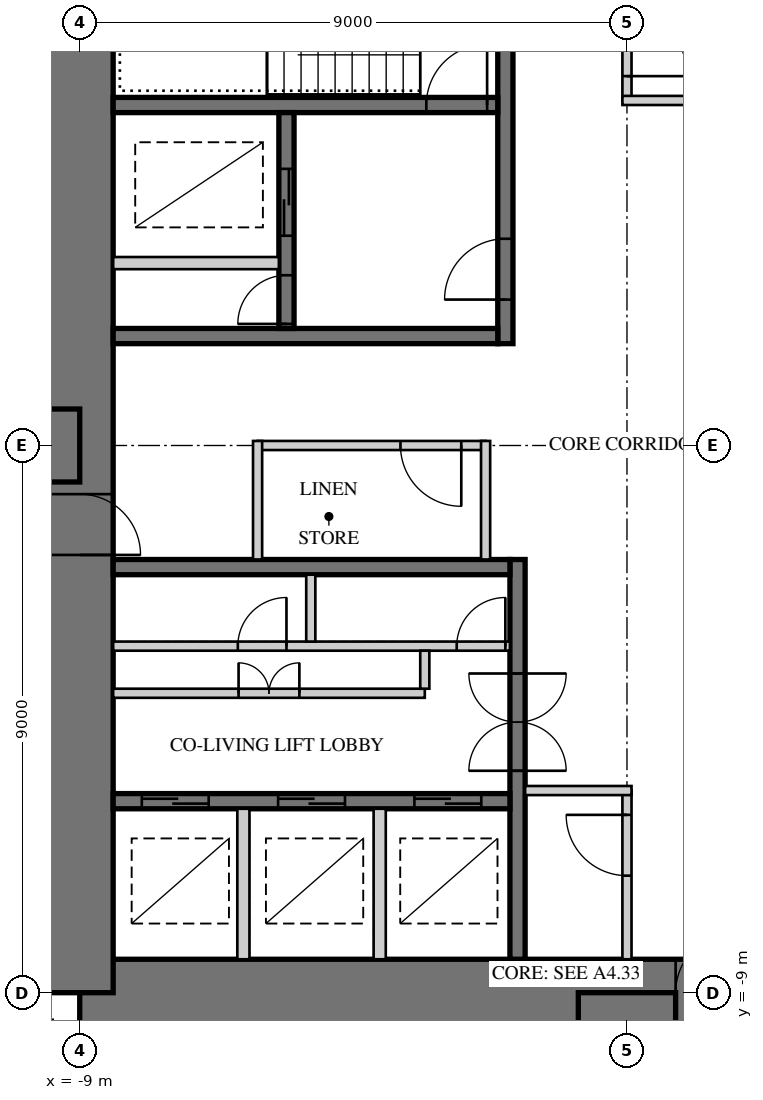
"""IFC4 building model, lengths in metres.
Left out: names, types, materials, properties, quantities, classifications, styles, units other than length and angle.
Written with IfcOpenShell. Run it as: python <this file> out.ifc"""

import sys

from ifc_helpers import new_model, si_unit, direction, frame, frame_2d, origin, place, context, subcontext, project, spatial, rectangle, extrude, element, fill, save


model = new_model("IFC4")
c1 = context("Model", 3, precision=1e-05, world=origin(), true_north=direction((0.0, 1.0)))
c2 = subcontext(c1, "Body", "Model", "MODEL_VIEW")
j1 = project(units=[si_unit("LENGTHUNIT", "METRE"), si_unit("PLANEANGLEUNIT", "RADIAN")], contexts=[c1])
p1 = place(None, origin())
s1 = spatial("IfcSite", under=j1, at=p1, CompositionType="ELEMENT")
p2 = place(p1, origin())
s2 = spatial("IfcBuilding", under=s1, at=p2, CompositionType="ELEMENT")
p3 = place(p2, frame((0.0, 0.0, 213.7)))
s3 = spatial("IfcBuildingStorey", under=s2, at=p3, CompositionType="ELEMENT", Elevation=213.7)
p4 = place(p3, frame((-9.0, -9.0, 0.0), z_axis=(0.0, 0.0, 1.0), x_axis=(1.0, 0.0, 0.0)))
e1 = element("IfcWall", 1, at=p4, inside=s3, PredefinedType="SHEAR", context=c2, shape_type="SweptSolid", body=[
    extrude(rectangle(XDim=18.0, YDim=1.1, at=frame_2d((9.0, 0.0))), origin(), (0.0, 0.0, 1.0), 3.4),
])
p5 = place(p4, frame((9.8, 0.0, 0.0)))
e2 = element("IfcOpeningElement", 2, at=p5, cuts=e1, PredefinedType="OPENING", context=c2, shape_type="SweptSolid", body=[
    extrude(rectangle(XDim=1.0, YDim=2.4, at=frame_2d((0.5, 1.2))), frame((0.0, 0.56, 0.0), z_axis=(0.0, -1.0, 0.0), x_axis=(1.0, 0.0, 0.0)), (0.0, 0.0, 1.0), 1.12),
])
p6 = place(p3, frame((-9.0, 9.0, 0.0), z_axis=(0.0, 0.0, 1.0), x_axis=(0.0, -1.0, 0.0)))
e3 = element("IfcWall", 3, at=p6, inside=s3, PredefinedType="SHEAR", context=c2, shape_type="SweptSolid", body=[
    extrude(rectangle(XDim=18.0, YDim=1.1, at=frame_2d((9.0, 0.0))), origin(), (0.0, 0.0, 1.0), 3.4),
])
p7 = place(p6, frame((9.8, 0.0, 0.0)))
e4 = element("IfcOpeningElement", 4, at=p7, cuts=e3, PredefinedType="OPENING", context=c2, shape_type="SweptSolid", body=[
    extrude(rectangle(XDim=1.0, YDim=2.4, at=frame_2d((0.5, 1.2))), frame((0.0, 0.56, 0.0), z_axis=(0.0, -1.0, 0.0), x_axis=(1.0, 0.0, 0.0)), (0.0, 0.0, 1.0), 1.12),
])
p8 = place(p3, frame((-2.0, 1.675, 0.0), z_axis=(0.0, 0.0, 1.0), x_axis=(0.0, 1.0, 0.0)))
e5 = element("IfcWall", 5, at=p8, inside=s3, PredefinedType="SHEAR", context=c2, shape_type="SweptSolid", body=[
    extrude(rectangle(XDim=6.775, YDim=0.25, at=frame_2d((3.387, 0.0))), origin(), (0.0, 0.0, 1.0), 3.4),
])
p9 = place(p8, frame((0.725, 0.0, 0.0)))
e6 = element("IfcOpeningElement", 6, at=p9, cuts=e5, PredefinedType="OPENING", context=c2, shape_type="SweptSolid", body=[
    extrude(rectangle(XDim=1.0, YDim=2.1, at=frame_2d((0.5, 1.05))), frame((0.0, 0.135, 0.0), z_axis=(0.0, -1.0, 0.0), x_axis=(1.0, 0.0, 0.0)), (0.0, 0.0, 1.0), 0.27),
])
p10 = place(p3, frame((-2.125, 1.8, 0.0), z_axis=(0.0, 0.0, 1.0), x_axis=(-1.0, 0.0, 0.0)))
e7 = element("IfcWall", 7, at=p10, inside=s3, PredefinedType="SHEAR", context=c2, shape_type="SweptSolid", body=[
    extrude(rectangle(XDim=6.325, YDim=0.25, at=frame_2d((3.163, 0.0))), origin(), (0.0, 0.0, 1.0), 3.4),
])
p11 = place(p3, frame((-2.125, 5.6, 0.0), z_axis=(0.0, 0.0, 1.0), x_axis=(-1.0, 0.0, 0.0)))
e8 = element("IfcWall", 8, at=p11, inside=s3, PredefinedType="SHEAR", context=c2, shape_type="SweptSolid", body=[
    extrude(rectangle(XDim=6.325, YDim=0.25, at=frame_2d((3.163, 0.0))), origin(), (0.0, 0.0, 1.0), 3.4),
])
p12 = place(p11, frame((0.175, 0.0, 0.0)))
e9 = element("IfcOpeningElement", 9, at=p12, cuts=e8, PredefinedType="OPENING", context=c2, shape_type="SweptSolid", body=[
    extrude(rectangle(XDim=1.0, YDim=2.1, at=frame_2d((0.5, 1.05))), frame((0.0, 0.135, 0.0), z_axis=(0.0, -1.0, 0.0), x_axis=(1.0, 0.0, 0.0)), (0.0, 0.0, 1.0), 0.27),
])
p13 = place(p3, frame((-5.6, 1.925, 0.0), z_axis=(0.0, 0.0, 1.0), x_axis=(0.0, 1.0, 0.0)))
e10 = element("IfcWall", 10, at=p13, inside=s3, PredefinedType="SHEAR", context=c2, shape_type="SweptSolid", body=[
    extrude(rectangle(XDim=3.55, YDim=0.25, at=frame_2d((1.775, 0.0))), origin(), (0.0, 0.0, 1.0), 3.4),
])
p14 = place(p13, frame((1.525, 0.0, 0.0)))
e11 = element("IfcOpeningElement", 11, at=p14, cuts=e10, PredefinedType="OPENING", context=c2, shape_type="SweptSolid", body=[
    extrude(rectangle(XDim=1.1, YDim=2.2, at=frame_2d((0.55, 1.1))), frame((0.0, 0.135, 0.0), z_axis=(0.0, -1.0, 0.0), x_axis=(1.0, 0.0, 0.0)), (0.0, 0.0, 1.0), 0.27),
])
p15 = place(p13, frame((0.075, 0.0, 0.0)))
e12 = element("IfcOpeningElement", 12, at=p15, cuts=e10, PredefinedType="OPENING", context=c2, shape_type="SweptSolid", body=[
    extrude(rectangle(XDim=0.8, YDim=2.1, at=frame_2d((0.4, 1.05))), frame((0.0, 0.135, 0.0), z_axis=(0.0, -1.0, 0.0), x_axis=(1.0, 0.0, 0.0)), (0.0, 0.0, 1.0), 0.27),
])
p16 = place(p3, frame((-5.725, 3.0, 0.0), z_axis=(0.0, 0.0, 1.0), x_axis=(-1.0, 0.0, 0.0)))
e13 = element("IfcWall", 13, at=p16, inside=s3, PredefinedType="PARTITIONING", context=c2, shape_type="SweptSolid", body=[
    extrude(rectangle(XDim=2.725, YDim=0.2, at=frame_2d((1.362, 0.0))), origin(), (0.0, 0.0, 1.0), 3.4),
])
p17 = place(p3, frame((-1.8, -1.875, 0.0), z_axis=(0.0, 0.0, 1.0), x_axis=(0.0, -1.0, 0.0)))
e14 = element("IfcWall", 14, at=p17, inside=s3, PredefinedType="SHEAR", context=c2, shape_type="SweptSolid", body=[
    extrude(rectangle(XDim=6.575, YDim=0.25, at=frame_2d((3.288, 0.0))), origin(), (0.0, 0.0, 1.0), 3.4),
])
p18 = place(p17, frame((1.875, 0.0, 0.0)))
e15 = element("IfcOpeningElement", 15, at=p18, cuts=e14, PredefinedType="OPENING", context=c2, shape_type="SweptSolid", body=[
    extrude(rectangle(XDim=1.6, YDim=2.4, at=frame_2d((0.8, 1.2))), frame((0.0, 0.135, 0.0), z_axis=(0.0, -1.0, 0.0), x_axis=(1.0, 0.0, 0.0)), (0.0, 0.0, 1.0), 0.27),
])
p19 = place(p3, frame((-1.925, -2.0, 0.0), z_axis=(0.0, 0.0, 1.0), x_axis=(-1.0, 0.0, 0.0)))
e16 = element("IfcWall", 16, at=p19, inside=s3, PredefinedType="SHEAR", context=c2, shape_type="SweptSolid", body=[
    extrude(rectangle(XDim=6.525, YDim=0.25, at=frame_2d((3.262, 0.0))), origin(), (0.0, 0.0, 1.0), 3.4),
])
p20 = place(p3, frame((-1.925, -5.85, 0.0), z_axis=(0.0, 0.0, 1.0), x_axis=(-1.0, 0.0, 0.0)))
e17 = element("IfcWall", 17, at=p20, inside=s3, PredefinedType="SHEAR", context=c2, shape_type="SweptSolid", body=[
    extrude(rectangle(XDim=6.525, YDim=0.25, at=frame_2d((3.262, 0.0))), origin(), (0.0, 0.0, 1.0), 3.4),
])
p21 = place(p20, frame((0.471, 0.0, 0.0)))
e18 = element("IfcOpeningElement", 18, at=p21, cuts=e17, PredefinedType="OPENING", context=c2, shape_type="SweptSolid", body=[
    extrude(rectangle(XDim=1.1, YDim=2.2, at=frame_2d((0.55, 1.1))), frame((0.0, 0.135, 0.0), z_axis=(0.0, -1.0, 0.0), x_axis=(1.0, 0.0, 0.0)), (0.0, 0.0, 1.0), 0.27),
])
p22 = place(p20, frame((2.712, 0.0, 0.0)))
e19 = element("IfcOpeningElement", 19, at=p22, cuts=e17, PredefinedType="OPENING", context=c2, shape_type="SweptSolid", body=[
    extrude(rectangle(XDim=1.1, YDim=2.2, at=frame_2d((0.55, 1.1))), frame((0.0, 0.135, 0.0), z_axis=(0.0, -1.0, 0.0), x_axis=(1.0, 0.0, 0.0)), (0.0, 0.0, 1.0), 0.27),
])
p23 = place(p20, frame((4.954, 0.0, 0.0)))
e20 = element("IfcOpeningElement", 20, at=p23, cuts=e17, PredefinedType="OPENING", context=c2, shape_type="SweptSolid", body=[
    extrude(rectangle(XDim=1.1, YDim=2.2, at=frame_2d((0.55, 1.1))), frame((0.0, 0.135, 0.0), z_axis=(0.0, -1.0, 0.0), x_axis=(1.0, 0.0, 0.0)), (0.0, 0.0, 1.0), 0.27),
])
p24 = place(p3, frame((-1.925, -3.3, 0.0), z_axis=(0.0, 0.0, 1.0), x_axis=(-1.0, 0.0, 0.0)))
e21 = element("IfcWall", 21, at=p24, inside=s3, PredefinedType="PARTITIONING", context=c2, shape_type="SweptSolid", body=[
    extrude(rectangle(XDim=6.525, YDim=0.15, at=frame_2d((3.262, 0.0))), origin(), (0.0, 0.0, 1.0), 3.4),
])
p25 = place(p24, frame((0.075, 0.0, 0.0)))
e22 = element("IfcOpeningElement", 22, at=p25, cuts=e21, PredefinedType="OPENING", context=c2, shape_type="SweptSolid", body=[
    extrude(rectangle(XDim=0.8, YDim=2.1, at=frame_2d((0.4, 1.05))), frame((0.0, 0.085, 0.0), z_axis=(0.0, -1.0, 0.0), x_axis=(1.0, 0.0, 0.0)), (0.0, 0.0, 1.0), 0.17),
])
p26 = place(p24, frame((3.675, 0.0, 0.0)))
e23 = element("IfcOpeningElement", 23, at=p26, cuts=e21, PredefinedType="OPENING", context=c2, shape_type="SweptSolid", body=[
    extrude(rectangle(XDim=0.8, YDim=2.1, at=frame_2d((0.4, 1.05))), frame((0.0, 0.085, 0.0), z_axis=(0.0, -1.0, 0.0), x_axis=(1.0, 0.0, 0.0)), (0.0, 0.0, 1.0), 0.17),
])
p27 = place(p3, frame((-5.2, -2.125, 0.0), z_axis=(0.0, 0.0, 1.0), x_axis=(0.0, -1.0, 0.0)))
e24 = element("IfcWall", 24, at=p27, inside=s3, PredefinedType="PARTITIONING", context=c2, shape_type="SweptSolid", body=[
    extrude(rectangle(XDim=1.1, YDim=0.15, at=frame_2d((0.55, 0.0))), origin(), (0.0, 0.0, 1.0), 3.4),
])
for number, where, z_axis, x_axis in (
    (25, (-4.067, -5.975, 0.0), (0.0, 0.0, 1.0), (0.0, -1.0, 0.0)),
    (26, (-6.308, -5.975, 0.0), (0.0, 0.0, 1.0), (0.0, -1.0, 0.0)),
):
    element("IfcWall", number, at=place(p3, frame(where, z_axis=z_axis, x_axis=x_axis)), inside=s3, PredefinedType="PARTITIONING", context=c2, shape_type="SweptSolid", body=[
        extrude(rectangle(XDim=2.475, YDim=0.2, at=frame_2d((1.237, 0.0))), origin(), (0.0, 0.0, 1.0), 3.4),
    ])
p28 = place(p3, frame((0.0, -9.0, 0.0), z_axis=(0.0, 0.0, 1.0), x_axis=(0.0, -1.0, 0.0)))
e27 = element("IfcWall", 27, at=p28, inside=s3, PredefinedType="SHEAR", context=c2, shape_type="SweptSolid", body=[
    extrude(rectangle(XDim=4.05, YDim=1.6, at=frame_2d((2.025, 0.0))), origin(), (0.0, 0.0, 1.0), 3.4),
])
p29 = place(p3, frame((-9.0, 0.0, 0.0), z_axis=(0.0, 0.0, 1.0), x_axis=(-1.0, 0.0, 0.0)))
e28 = element("IfcWall", 28, at=p29, inside=s3, PredefinedType="SHEAR", context=c2, shape_type="SweptSolid", body=[
    extrude(rectangle(XDim=18.0, YDim=1.2, at=frame_2d((9.0, 0.0))), origin(), (0.0, 0.0, 1.0), 3.4),
])
p30 = place(p29, frame((3.95, 0.0, 0.0)))
e29 = element("IfcOpeningElement", 29, at=p30, cuts=e28, PredefinedType="OPENING", context=c2, shape_type="SweptSolid", body=[
    extrude(rectangle(XDim=1.0, YDim=2.15, at=frame_2d((0.5, 1.075))), frame((0.0, 0.61, 0.0), z_axis=(0.0, -1.0, 0.0), x_axis=(1.0, 0.0, 0.0)), (0.0, 0.0, 1.0), 1.22),
])
p31 = place(p29, frame((6.6, 0.0, 0.0)))
e30 = element("IfcOpeningElement", 30, at=p31, cuts=e28, PredefinedType="OPENING", context=c2, shape_type="SweptSolid", body=[
    extrude(rectangle(XDim=1.0, YDim=2.15, at=frame_2d((0.5, 1.075))), frame((0.0, 0.61, 0.0), z_axis=(0.0, -1.0, 0.0), x_axis=(1.0, 0.0, 0.0)), (0.0, 0.0, 1.0), 1.22),
])
p32 = place(p29, frame((13.25, 0.0, 0.0)))
e31 = element("IfcOpeningElement", 31, at=p32, cuts=e28, PredefinedType="OPENING", context=c2, shape_type="SweptSolid", body=[
    extrude(rectangle(XDim=1.0, YDim=2.0, at=frame_2d((0.5, 1.0))), frame((0.0, 0.61, 0.0), z_axis=(0.0, -1.0, 0.0), x_axis=(1.0, 0.0, 0.0)), (0.0, 0.0, 1.0), 1.22),
])
p33 = place(p3, frame((-9.57, -9.445, 0.0), z_axis=(0.0, 0.0, 1.0), x_axis=(0.0, -1.0, 0.0)))
e32 = element("IfcWall", 32, at=p33, inside=s3, PredefinedType="SOLIDWALL", context=c2, shape_type="SweptSolid", body=[
    extrude(rectangle(XDim=3.125, YDim=0.25, at=frame_2d((1.562, 0.0))), origin(), (0.0, 0.0, 1.0), 3.15),
])
p34 = place(p33, frame((0.6, 0.0, 0.0)))
e33 = element("IfcOpeningElement", 33, at=p34, cuts=e32, PredefinedType="OPENING", context=c2, shape_type="SweptSolid", body=[
    extrude(rectangle(XDim=1.0, YDim=2.2, at=frame_2d((0.5, 1.1))), frame((0.0, 0.135, 0.0), z_axis=(0.0, -1.0, 0.0), x_axis=(1.0, 0.0, 0.0)), (0.0, 0.0, 1.0), 0.27),
])
p35 = place(p3, frame((-2.325, 0.0, 0.0), z_axis=(0.0, 0.0, 1.0), x_axis=(-1.0, 0.0, 0.0)))
e34 = element("IfcWall", 34, at=p35, inside=s3, PredefinedType="PARTITIONING", context=c2, shape_type="SweptSolid", body=[
    extrude(rectangle(XDim=3.75, YDim=0.15, at=frame_2d((1.875, 0.0))), origin(), (0.0, 0.0, 1.0), 3.15),
])
p36 = place(p35, frame((0.4, 0.0, 0.0)))
e35 = element("IfcOpeningElement", 35, at=p36, cuts=e34, PredefinedType="OPENING", context=c2, shape_type="SweptSolid", body=[
    extrude(rectangle(XDim=1.0, YDim=2.1, at=frame_2d((0.5, 1.05))), frame((0.0, 0.085, 0.0), z_axis=(0.0, -1.0, 0.0), x_axis=(1.0, 0.0, 0.0)), (0.0, 0.0, 1.0), 0.17),
])
for number, where, z_axis, x_axis in (
    (36, (-2.325, -1.875, 0.0), (0.0, 0.0, 1.0), (0.0, 1.0, 0.0)),
    (37, (-6.075, 0.075, 0.0), (0.0, 0.0, 1.0), (0.0, -1.0, 0.0)),
):
    element("IfcWall", number, at=place(p3, frame(where, z_axis=z_axis, x_axis=x_axis)), inside=s3, PredefinedType="PARTITIONING", context=c2, shape_type="SweptSolid", body=[
        extrude(rectangle(XDim=1.95, YDim=0.15, at=frame_2d((0.975, 0.0))), origin(), (0.0, 0.0, 1.0), 3.15),
    ])
p37 = place(p3, frame((0.0, 5.675, 0.0), z_axis=(0.0, 0.0, 1.0), x_axis=(0.0, 1.0, 0.0)))
e38 = element("IfcWall", 38, at=p37, inside=s3, PredefinedType="PARTITIONING", context=c2, shape_type="SweptSolid", body=[
    extrude(rectangle(XDim=2.775, YDim=0.15, at=frame_2d((1.387, 0.0))), origin(), (0.0, 0.0, 1.0), 3.15),
])
p38 = place(p37, frame((0.4, 0.0, 0.0)))
e39 = element("IfcOpeningElement", 39, at=p38, cuts=e38, PredefinedType="OPENING", context=c2, shape_type="SweptSolid", body=[
    extrude(rectangle(XDim=1.0, YDim=2.1, at=frame_2d((0.5, 1.05))), frame((0.0, 0.085, 0.0), z_axis=(0.0, -1.0, 0.0), x_axis=(1.0, 0.0, 0.0)), (0.0, 0.0, 1.0), 0.17),
])
p39 = place(p3, frame((1.675, 5.675, 0.0), z_axis=(0.0, 0.0, 1.0), x_axis=(-1.0, 0.0, 0.0)))
e40 = element("IfcWall", 40, at=p39, inside=s3, PredefinedType="PARTITIONING", context=c2, shape_type="SweptSolid", body=[
    extrude(rectangle(XDim=1.75, YDim=0.15, at=frame_2d((0.875, 0.0))), origin(), (0.0, 0.0, 1.0), 3.15),
])
p40 = place(p3, frame((0.0, -5.675, 0.0), z_axis=(0.0, 0.0, 1.0), x_axis=(0.0, -1.0, 0.0)))
e41 = element("IfcWall", 41, at=p40, inside=s3, PredefinedType="PARTITIONING", context=c2, shape_type="SweptSolid", body=[
    extrude(rectangle(XDim=2.775, YDim=0.15, at=frame_2d((1.387, 0.0))), origin(), (0.0, 0.0, 1.0), 3.15),
])
p41 = place(p40, frame((0.4, 0.0, 0.0)))
e42 = element("IfcOpeningElement", 42, at=p41, cuts=e41, PredefinedType="OPENING", context=c2, shape_type="SweptSolid", body=[
    extrude(rectangle(XDim=1.0, YDim=2.1, at=frame_2d((0.5, 1.05))), frame((0.0, 0.085, 0.0), z_axis=(0.0, -1.0, 0.0), x_axis=(1.0, 0.0, 0.0)), (0.0, 0.0, 1.0), 0.17),
])
p42 = place(p3, frame((-1.675, -5.675, 0.0), z_axis=(0.0, 0.0, 1.0), x_axis=(1.0, 0.0, 0.0)))
e43 = element("IfcWall", 43, at=p42, inside=s3, PredefinedType="PARTITIONING", context=c2, shape_type="SweptSolid", body=[
    extrude(rectangle(XDim=1.75, YDim=0.15, at=frame_2d((0.875, 0.0))), origin(), (0.0, 0.0, 1.0), 3.15),
])
p43 = place(p3, frame((-3.325, -4.075, 0.0), z_axis=(0.0, 0.0, 1.0), x_axis=(-1.0, 0.0, 0.0)))
e44 = element("IfcWall", 44, at=p43, inside=s3, PredefinedType="PARTITIONING", context=c2, shape_type="SweptSolid", body=[
    extrude(rectangle(XDim=5.125, YDim=0.15, at=frame_2d((2.562, 0.0))), origin(), (0.0, 0.0, 1.0), 3.15),
])
p44 = place(p43, frame((2.062, 0.0, 0.0)))
e45 = element("IfcOpeningElement", 45, at=p44, cuts=e44, PredefinedType="OPENING", context=c2, shape_type="SweptSolid", body=[
    extrude(rectangle(XDim=1.0, YDim=2.1, at=frame_2d((0.5, 1.05))), frame((0.0, 0.085, 0.0), z_axis=(0.0, -1.0, 0.0), x_axis=(1.0, 0.0, 0.0)), (0.0, 0.0, 1.0), 0.17),
])
p45 = place(p3, frame((-3.325, -3.375, 0.0), z_axis=(0.0, 0.0, 1.0), x_axis=(0.0, -1.0, 0.0)))
e46 = element("IfcWall", 46, at=p45, inside=s3, PredefinedType="PARTITIONING", context=c2, shape_type="SweptSolid", body=[
    extrude(rectangle(XDim=0.625, YDim=0.15, at=frame_2d((0.312, 0.0))), origin(), (0.0, 0.0, 1.0), 3.15),
])
p46 = place(p36, origin())
e47 = element("IfcDoor", 47, at=p46, inside=s3, OperationType="SINGLE_SWING_LEFT", PredefinedType="DOOR", context=c2, shape_type="SweptSolid", body=[
    extrude(rectangle(XDim=1.0, YDim=2.1, at=frame_2d((0.5, 1.05))), frame((0.0, 0.025, 0.0), z_axis=(0.0, -1.0, 0.0), x_axis=(1.0, 0.0, 0.0)), (0.0, 0.0, 1.0), 0.05),
])
fill(e35, e47)
p47 = place(p38, frame((1.0, 0.0, 0.0), z_axis=(0.0, 0.0, 1.0), x_axis=(-1.0, 0.0, 0.0)))
e48 = element("IfcDoor", 48, at=p47, inside=s3, OperationType="SINGLE_SWING_RIGHT", PredefinedType="DOOR", context=c2, shape_type="SweptSolid", body=[
    extrude(rectangle(XDim=1.0, YDim=2.1, at=frame_2d((0.5, 1.05))), frame((0.0, 0.025, 0.0), z_axis=(0.0, -1.0, 0.0), x_axis=(1.0, 0.0, 0.0)), (0.0, 0.0, 1.0), 0.05),
])
fill(e39, e48)
p48 = place(p41, frame((1.0, 0.0, 0.0), z_axis=(0.0, 0.0, 1.0), x_axis=(-1.0, 0.0, 0.0)))
e49 = element("IfcDoor", 49, at=p48, inside=s3, OperationType="SINGLE_SWING_RIGHT", PredefinedType="DOOR", context=c2, shape_type="SweptSolid", body=[
    extrude(rectangle(XDim=1.0, YDim=2.1, at=frame_2d((0.5, 1.05))), frame((0.0, 0.025, 0.0), z_axis=(0.0, -1.0, 0.0), x_axis=(1.0, 0.0, 0.0)), (0.0, 0.0, 1.0), 0.05),
])
fill(e42, e49)
p49 = place(p44, frame((1.0, 0.0, 0.0), z_axis=(0.0, 0.0, 1.0), x_axis=(-1.0, 0.0, 0.0)))
e50 = element("IfcDoor", 50, at=p49, inside=s3, OperationType="DOUBLE_DOOR_SINGLE_SWING", PredefinedType="DOOR", context=c2, shape_type="SweptSolid", body=[
    extrude(rectangle(XDim=1.0, YDim=2.1, at=frame_2d((0.5, 1.05))), frame((0.0, 0.025, 0.0), z_axis=(0.0, -1.0, 0.0), x_axis=(1.0, 0.0, 0.0)), (0.0, 0.0, 1.0), 0.05),
])
fill(e45, e50)
p50 = place(p5, origin())
e51 = element("IfcDoor", 51, at=p50, inside=s3, OperationType="SINGLE_SWING_RIGHT", PredefinedType="DOOR", context=c2, shape_type="SweptSolid", body=[
    extrude(rectangle(XDim=1.0, YDim=2.4, at=frame_2d((0.5, 1.2))), frame((0.0, 0.055, 0.0), z_axis=(0.0, -1.0, 0.0), x_axis=(1.0, 0.0, 0.0)), (0.0, 0.0, 1.0), 0.05),
])
fill(e2, e51)
p51 = place(p7, origin())
e52 = element("IfcDoor", 52, at=p51, inside=s3, OperationType="SINGLE_SWING_RIGHT", PredefinedType="DOOR", context=c2, shape_type="SweptSolid", body=[
    extrude(rectangle(XDim=1.0, YDim=2.4, at=frame_2d((0.5, 1.2))), frame((0.0, 0.055, 0.0), z_axis=(0.0, -1.0, 0.0), x_axis=(1.0, 0.0, 0.0)), (0.0, 0.0, 1.0), 0.05),
])
fill(e4, e52)
p52 = place(p9, origin())
e53 = element("IfcDoor", 53, at=p52, inside=s3, OperationType="SINGLE_SWING_LEFT", PredefinedType="DOOR", context=c2, shape_type="SweptSolid", body=[
    extrude(rectangle(XDim=1.0, YDim=2.1, at=frame_2d((0.5, 1.05))), frame((0.0, 0.025, 0.0), z_axis=(0.0, -1.0, 0.0), x_axis=(1.0, 0.0, 0.0)), (0.0, 0.0, 1.0), 0.05),
])
fill(e6, e53)
p53 = place(p12, frame((1.0, 0.0, 0.0), z_axis=(0.0, 0.0, 1.0), x_axis=(-1.0, 0.0, 0.0)))
e54 = element("IfcDoor", 54, at=p53, inside=s3, OperationType="SINGLE_SWING_RIGHT", PredefinedType="DOOR", context=c2, shape_type="SweptSolid", body=[
    extrude(rectangle(XDim=1.0, YDim=2.1, at=frame_2d((0.5, 1.05))), frame((0.0, 0.025, 0.0), z_axis=(0.0, -1.0, 0.0), x_axis=(1.0, 0.0, 0.0)), (0.0, 0.0, 1.0), 0.05),
])
fill(e9, e54)
p54 = place(p14, origin())
e55 = element("IfcDoor", 55, at=p54, inside=s3, OperationType="DOUBLE_DOOR_SLIDING", PredefinedType="DOOR", context=c2, shape_type="SweptSolid", body=[
    extrude(rectangle(XDim=1.1, YDim=2.2, at=frame_2d((0.55, 1.1))), frame((0.0, 0.025, 0.0), z_axis=(0.0, -1.0, 0.0), x_axis=(1.0, 0.0, 0.0)), (0.0, 0.0, 1.0), 0.05),
])
fill(e11, e55)
p55 = place(p15, origin())
e56 = element("IfcDoor", 56, at=p55, inside=s3, OperationType="SINGLE_SWING_LEFT", PredefinedType="DOOR", context=c2, shape_type="SweptSolid", body=[
    extrude(rectangle(XDim=0.8, YDim=2.1, at=frame_2d((0.4, 1.05))), frame((0.0, 0.025, 0.0), z_axis=(0.0, -1.0, 0.0), x_axis=(1.0, 0.0, 0.0)), (0.0, 0.0, 1.0), 0.05),
])
fill(e12, e56)
p56 = place(p21, origin())
e57 = element("IfcDoor", 57, at=p56, inside=s3, OperationType="DOUBLE_DOOR_SLIDING", PredefinedType="DOOR", context=c2, shape_type="SweptSolid", body=[
    extrude(rectangle(XDim=1.1, YDim=2.2, at=frame_2d((0.55, 1.1))), frame((0.0, 0.025, 0.0), z_axis=(0.0, -1.0, 0.0), x_axis=(1.0, 0.0, 0.0)), (0.0, 0.0, 1.0), 0.05),
])
fill(e18, e57)
p57 = place(p22, origin())
e58 = element("IfcDoor", 58, at=p57, inside=s3, OperationType="DOUBLE_DOOR_SLIDING", PredefinedType="DOOR", context=c2, shape_type="SweptSolid", body=[
    extrude(rectangle(XDim=1.1, YDim=2.2, at=frame_2d((0.55, 1.1))), frame((0.0, 0.025, 0.0), z_axis=(0.0, -1.0, 0.0), x_axis=(1.0, 0.0, 0.0)), (0.0, 0.0, 1.0), 0.05),
])
fill(e19, e58)
p58 = place(p23, origin())
e59 = element("IfcDoor", 59, at=p58, inside=s3, OperationType="DOUBLE_DOOR_SLIDING", PredefinedType="DOOR", context=c2, shape_type="SweptSolid", body=[
    extrude(rectangle(XDim=1.1, YDim=2.2, at=frame_2d((0.55, 1.1))), frame((0.0, 0.025, 0.0), z_axis=(0.0, -1.0, 0.0), x_axis=(1.0, 0.0, 0.0)), (0.0, 0.0, 1.0), 0.05),
])
fill(e20, e59)
p59 = place(p18, origin())
e60 = element("IfcDoor", 60, at=p59, inside=s3, OperationType="DOUBLE_DOOR_DOUBLE_SWING", PredefinedType="DOOR", context=c2, shape_type="SweptSolid", body=[
    extrude(rectangle(XDim=1.6, YDim=2.4, at=frame_2d((0.8, 1.2))), frame((0.0, 0.025, 0.0), z_axis=(0.0, -1.0, 0.0), x_axis=(1.0, 0.0, 0.0)), (0.0, 0.0, 1.0), 0.05),
])
fill(e15, e60)
p60 = place(p25, frame((0.8, 0.0, 0.0), z_axis=(0.0, 0.0, 1.0), x_axis=(-1.0, 0.0, 0.0)))
e61 = element("IfcDoor", 61, at=p60, inside=s3, OperationType="SINGLE_SWING_RIGHT", PredefinedType="DOOR", context=c2, shape_type="SweptSolid", body=[
    extrude(rectangle(XDim=0.8, YDim=2.1, at=frame_2d((0.4, 1.05))), frame((0.0, 0.025, 0.0), z_axis=(0.0, -1.0, 0.0), x_axis=(1.0, 0.0, 0.0)), (0.0, 0.0, 1.0), 0.05),
])
fill(e22, e61)
p61 = place(p26, frame((0.8, 0.0, 0.0), z_axis=(0.0, 0.0, 1.0), x_axis=(-1.0, 0.0, 0.0)))
e62 = element("IfcDoor", 62, at=p61, inside=s3, OperationType="SINGLE_SWING_RIGHT", PredefinedType="DOOR", context=c2, shape_type="SweptSolid", body=[
    extrude(rectangle(XDim=0.8, YDim=2.1, at=frame_2d((0.4, 1.05))), frame((0.0, 0.025, 0.0), z_axis=(0.0, -1.0, 0.0), x_axis=(1.0, 0.0, 0.0)), (0.0, 0.0, 1.0), 0.05),
])
fill(e23, e62)
save(model, sys.argv[1])
